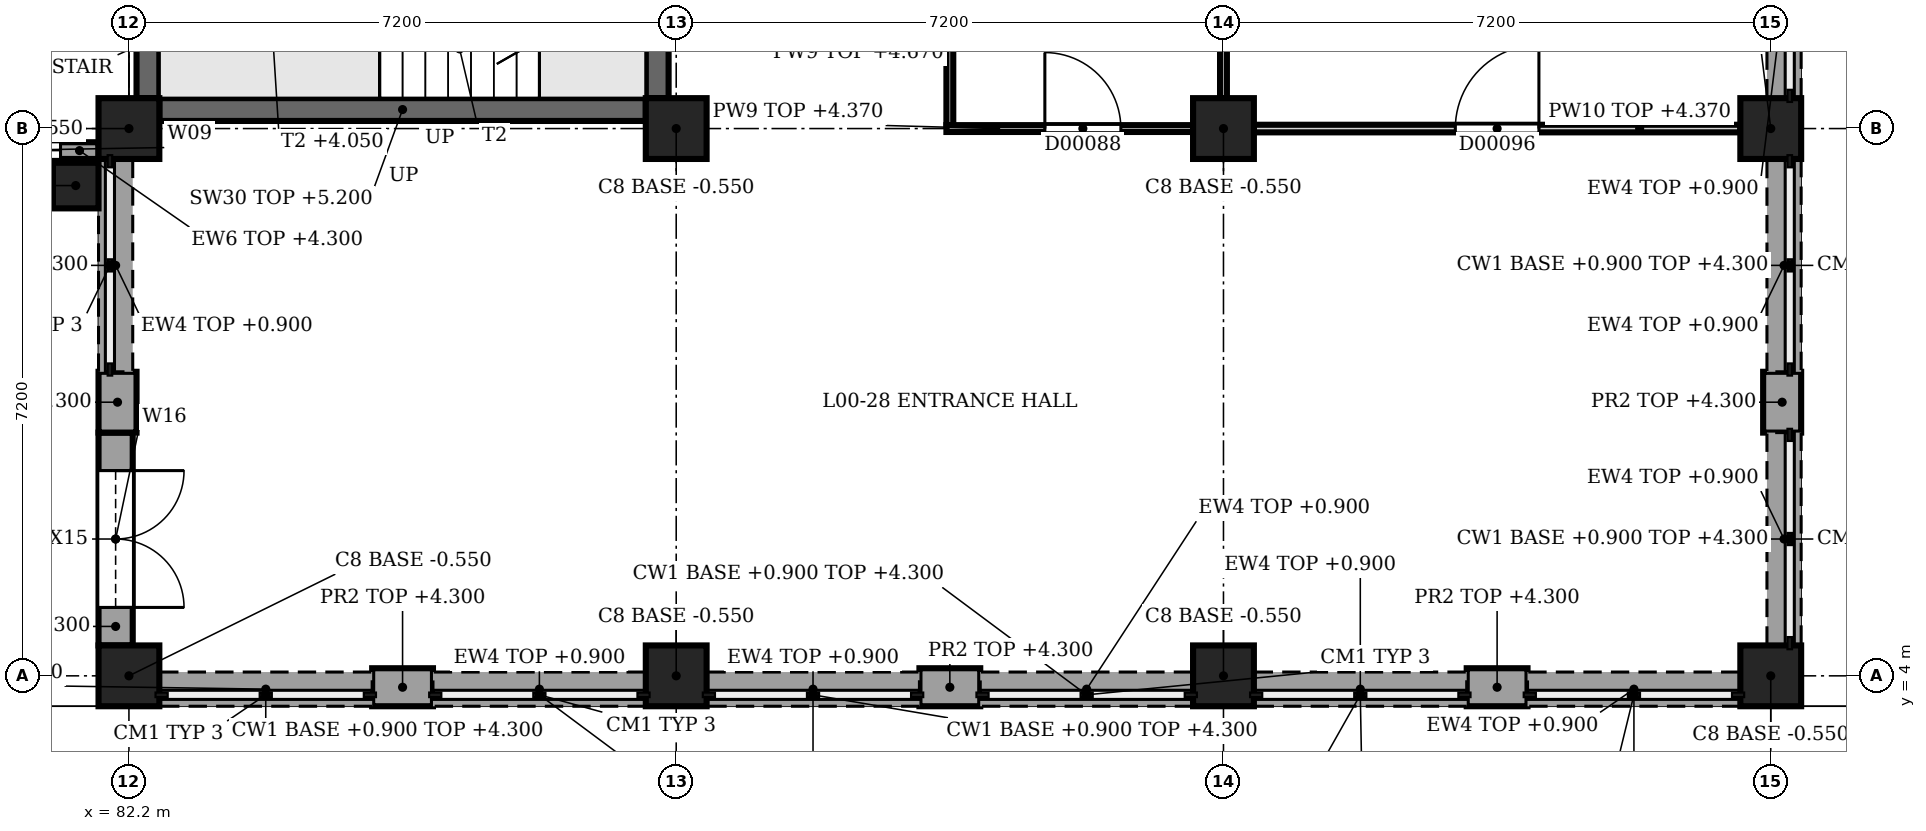
"""IFC4 building model, lengths in metres.
Left out: names, types, materials, properties, quantities, classifications, styles, units other than length and angle.
Written with IfcOpenShell. Run it as: python <this file> out.ifc"""

import sys

from ifc_helpers import new_model, si_unit, direction, frame, frame_2d, origin, origin_2d, place, context, subcontext, project, spatial, rectangle, extrude, element, fill, save


model = new_model("IFC4")
c1 = context("Model", 3, precision=1e-05, world=origin(), true_north=direction((0.0, 1.0)))
c2 = subcontext(c1, "Body", "Model", "MODEL_VIEW")
j1 = project(units=[si_unit("LENGTHUNIT", "METRE"), si_unit("PLANEANGLEUNIT", "RADIAN")], contexts=[c1])
p1 = place(None, origin())
s1 = spatial("IfcSite", under=j1, at=p1, CompositionType="ELEMENT")
p2 = place(p1, origin())
s2 = spatial("IfcBuilding", under=s1, at=p2, CompositionType="ELEMENT")
p3 = place(p2, origin())
s3 = spatial("IfcBuildingStorey", under=s2, at=p3, CompositionType="ELEMENT", Elevation=0.0)
for number, where, z_axis, x_axis in (
    (1, (82.2, 4.0, -0.55), (0.0, 0.0, 1.0), (1.0, 0.0, 0.0)),
    (2, (82.2, 11.2, -0.55), (0.0, 0.0, 1.0), (1.0, 0.0, 0.0)),
    (3, (89.4, 4.0, -0.55), (0.0, 0.0, 1.0), (1.0, 0.0, 0.0)),
    (4, (89.4, 11.2, -0.55), (0.0, 0.0, 1.0), (1.0, 0.0, 0.0)),
    (5, (96.6, 4.0, -0.55), (0.0, 0.0, 1.0), (1.0, 0.0, 0.0)),
    (6, (96.6, 11.2, -0.55), (0.0, 0.0, 1.0), (1.0, 0.0, 0.0)),
    (7, (103.8, 4.0, -0.55), (0.0, 0.0, 1.0), (1.0, 0.0, 0.0)),
    (8, (103.8, 11.2, -0.55), (0.0, 0.0, 1.0), (1.0, 0.0, 0.0)),
):
    element("IfcColumn", number, at=place(p3, frame(where, z_axis=z_axis, x_axis=x_axis)), inside=s3, PredefinedType="COLUMN", context=c2, shape_type="SweptSolid", body=[
        extrude(rectangle(XDim=0.8, YDim=0.8, at=origin_2d()), origin(), (0.0, 0.0, 1.0), 5.95),
    ])
p4 = place(p3, frame((81.5, 10.45, -0.55), z_axis=(0.0, 0.0, 1.0), x_axis=(1.0, 0.0, 0.0)))
e9 = element("IfcColumn", 9, at=p4, inside=s3, PredefinedType="COLUMN", context=c2, shape_type="SweptSolid", body=[
    extrude(rectangle(XDim=0.6, YDim=0.6, at=origin_2d()), origin(), (0.0, 0.0, 1.0), 5.95),
])
p5 = place(p3, frame((103.95, 8.0, 0.0), z_axis=(0.0, 0.0, 1.0), x_axis=(0.0, -1.0, 0.0)))
e10 = element("IfcWall", 10, at=p5, inside=s3, PredefinedType="SOLIDWALL", context=c2, shape_type="SweptSolid", body=[
    extrude(rectangle(XDim=0.8, YDim=0.5, at=frame_2d((0.4, 0.0))), origin(), (0.0, 0.0, 1.0), 4.3),
])
p6 = place(p3, frame((103.975, 14.4, 0.0), z_axis=(0.0, 0.0, 1.0), x_axis=(0.0, -1.0, 0.0)))
e11 = element("IfcWall", 11, at=p6, inside=s3, PredefinedType="SOLIDWALL", context=c2, shape_type="SweptSolid", body=[
    extrude(rectangle(XDim=2.8, YDim=0.45, at=frame_2d((1.4, 0.0))), origin(), (0.0, 0.0, 1.0), 0.9),
])
for number, where, z_axis, x_axis in (
    (12, (103.975, 10.8, 0.0), (0.0, 0.0, 1.0), (0.0, -1.0, 0.0)),
    (13, (103.975, 7.2, 0.0), (0.0, 0.0, 1.0), (0.0, -1.0, 0.0)),
):
    element("IfcWall", number, at=place(p3, frame(where, z_axis=z_axis, x_axis=x_axis)), inside=s3, PredefinedType="SOLIDWALL", context=c2, shape_type="SweptSolid", body=[
        extrude(rectangle(XDim=2.8, YDim=0.45, at=frame_2d((1.4, 0.0))), origin(), (0.0, 0.0, 1.0), 0.9),
    ])
p7 = place(p3, frame((100.6, 3.85, 0.0), z_axis=(0.0, 0.0, 1.0), x_axis=(-1.0, 0.0, 0.0)))
e14 = element("IfcWall", 14, at=p7, inside=s3, PredefinedType="SOLIDWALL", context=c2, shape_type="SweptSolid", body=[
    extrude(rectangle(XDim=0.8, YDim=0.5, at=frame_2d((0.4, 0.0))), origin(), (0.0, 0.0, 1.0), 4.3),
])
p8 = place(p3, frame((93.4, 3.85, 0.0), z_axis=(0.0, 0.0, 1.0), x_axis=(-1.0, 0.0, 0.0)))
e15 = element("IfcWall", 15, at=p8, inside=s3, PredefinedType="SOLIDWALL", context=c2, shape_type="SweptSolid", body=[
    extrude(rectangle(XDim=0.8, YDim=0.5, at=frame_2d((0.4, 0.0))), origin(), (0.0, 0.0, 1.0), 4.3),
])
p9 = place(p3, frame((86.2, 3.85, 0.0), z_axis=(0.0, 0.0, 1.0), x_axis=(-1.0, 0.0, 0.0)))
e16 = element("IfcWall", 16, at=p9, inside=s3, PredefinedType="SOLIDWALL", context=c2, shape_type="SweptSolid", body=[
    extrude(rectangle(XDim=0.8, YDim=0.5, at=frame_2d((0.4, 0.0))), origin(), (0.0, 0.0, 1.0), 4.3),
])
p10 = place(p3, frame((103.4, 3.825, 0.0), z_axis=(0.0, 0.0, 1.0), x_axis=(-1.0, 0.0, 0.0)))
e17 = element("IfcWall", 17, at=p10, inside=s3, PredefinedType="SOLIDWALL", context=c2, shape_type="SweptSolid", body=[
    extrude(rectangle(XDim=2.8, YDim=0.45, at=frame_2d((1.4, 0.0))), origin(), (0.0, 0.0, 1.0), 0.9),
])
for number, where, z_axis, x_axis in (
    (18, (99.8, 3.825, 0.0), (0.0, 0.0, 1.0), (-1.0, 0.0, 0.0)),
    (19, (96.2, 3.825, 0.0), (0.0, 0.0, 1.0), (-1.0, 0.0, 0.0)),
    (20, (92.6, 3.825, 0.0), (0.0, 0.0, 1.0), (-1.0, 0.0, 0.0)),
    (21, (89.0, 3.825, 0.0), (0.0, 0.0, 1.0), (-1.0, 0.0, 0.0)),
):
    element("IfcWall", number, at=place(p3, frame(where, z_axis=z_axis, x_axis=x_axis)), inside=s3, PredefinedType="SOLIDWALL", context=c2, shape_type="SweptSolid", body=[
        extrude(rectangle(XDim=2.8, YDim=0.45, at=frame_2d((1.4, 0.0))), origin(), (0.0, 0.0, 1.0), 0.9),
    ])
p11 = place(p3, frame((85.4, 3.825, 0.0), z_axis=(0.0, 0.0, 1.0), x_axis=(-1.0, 0.0, 0.0)))
e22 = element("IfcWall", 22, at=p11, inside=s3, PredefinedType="SOLIDWALL", context=c2, shape_type="SweptSolid", body=[
    extrude(rectangle(XDim=2.8, YDim=0.45, at=frame_2d((1.4, 0.0))), origin(), (0.0, 0.0, 1.0), 0.9),
])
p12 = place(p3, frame((82.05, 7.2, 0.0), z_axis=(0.0, 0.0, 1.0), x_axis=(0.0, 1.0, 0.0)))
e23 = element("IfcWall", 23, at=p12, inside=s3, PredefinedType="SOLIDWALL", context=c2, shape_type="SweptSolid", body=[
    extrude(rectangle(XDim=0.8, YDim=0.5, at=frame_2d((0.4, 0.0))), origin(), (0.0, 0.0, 1.0), 4.3),
])
p13 = place(p3, frame((82.025, 4.4, 0.0), z_axis=(0.0, 0.0, 1.0), x_axis=(0.0, 1.0, 0.0)))
e24 = element("IfcWall", 24, at=p13, inside=s3, PredefinedType="SOLIDWALL", context=c2, shape_type="SweptSolid", body=[
    extrude(rectangle(XDim=2.8, YDim=0.45, at=frame_2d((1.4, 0.0))), origin(), (0.0, 0.0, 1.0), 4.3),
])
p14 = place(p13, frame((0.5, 0.0, 0.0)))
e25 = element("IfcOpeningElement", 25, at=p14, cuts=e24, PredefinedType="OPENING", context=c2, shape_type="SweptSolid", body=[
    extrude(rectangle(XDim=1.8, YDim=2.4, at=frame_2d((0.9, 1.2))), frame((0.0, 0.235, 0.0), z_axis=(0.0, -1.0, 0.0), x_axis=(1.0, 0.0, 0.0)), (0.0, 0.0, 1.0), 0.47),
])
p15 = place(p13, frame((0.5, 0.0, 2.5)))
e26 = element("IfcOpeningElement", 26, at=p15, cuts=e24, PredefinedType="OPENING", context=c2, shape_type="SweptSolid", body=[
    extrude(rectangle(XDim=1.8, YDim=0.45, at=frame_2d((0.9, 0.225))), frame((0.0, 0.235, 0.0), z_axis=(0.0, -1.0, 0.0), x_axis=(1.0, 0.0, 0.0)), (0.0, 0.0, 1.0), 0.47),
])
p16 = place(p3, frame((82.025, 8.0, 0.0), z_axis=(0.0, 0.0, 1.0), x_axis=(0.0, 1.0, 0.0)))
e27 = element("IfcWall", 27, at=p16, inside=s3, PredefinedType="SOLIDWALL", context=c2, shape_type="SweptSolid", body=[
    extrude(rectangle(XDim=2.8, YDim=0.45, at=frame_2d((1.4, 0.0))), origin(), (0.0, 0.0, 1.0), 0.9),
])
p17 = place(p3, frame((81.8, 10.91, 0.0), z_axis=(0.0, 0.0, 1.0), x_axis=(-1.0, 0.0, 0.0)))
e28 = element("IfcWall", 28, at=p17, inside=s3, PredefinedType="SOLIDWALL", context=c2, shape_type="SweptSolid", body=[
    extrude(rectangle(XDim=2.8, YDim=0.22, at=frame_2d((1.4, 0.0))), origin(), (0.0, 0.0, 1.0), 4.3),
])
p18 = place(p17, frame((0.5, 0.0, 0.9)))
e29 = element("IfcOpeningElement", 29, at=p18, cuts=e28, PredefinedType="OPENING", context=c2, shape_type="SweptSolid", body=[
    extrude(rectangle(XDim=1.8, YDim=2.1, at=frame_2d((0.9, 1.05))), frame((0.0, 0.12, 0.0), z_axis=(0.0, -1.0, 0.0), x_axis=(1.0, 0.0, 0.0)), (0.0, 0.0, 1.0), 0.24),
])
p19 = place(p3, frame((89.15, 11.6, 0.0), z_axis=(0.0, 0.0, 1.0), x_axis=(0.0, 1.0, 0.0)))
e30 = element("IfcWall", 30, at=p19, inside=s3, PredefinedType="SHEAR", context=c2, shape_type="SweptSolid", body=[
    extrude(rectangle(XDim=6.4, YDim=0.3, at=frame_2d((3.2, 0.0))), origin(), (0.0, 0.0, 1.0), 5.2),
])
p20 = place(p19, frame((4.2, 0.0, 0.0)))
e31 = element("IfcOpeningElement", 31, at=p20, cuts=e30, PredefinedType="OPENING", context=c2, shape_type="SweptSolid", body=[
    extrude(rectangle(XDim=1.2, YDim=2.1, at=frame_2d((0.6, 1.05))), frame((0.0, 0.16, 0.0), z_axis=(0.0, -1.0, 0.0), x_axis=(1.0, 0.0, 0.0)), (0.0, 0.0, 1.0), 0.32),
])
for number, where, z_axis, x_axis in (
    (32, (82.45, 11.6, 0.0), (0.0, 0.0, 1.0), (0.0, 1.0, 0.0)),
    (33, (82.6, 11.45, 0.0), (0.0, 0.0, 1.0), (1.0, 0.0, 0.0)),
):
    element("IfcWall", number, at=place(p3, frame(where, z_axis=z_axis, x_axis=x_axis)), inside=s3, PredefinedType="SHEAR", context=c2, shape_type="SweptSolid", body=[
        extrude(rectangle(XDim=6.4, YDim=0.3, at=frame_2d((3.2, 0.0))), origin(), (0.0, 0.0, 1.0), 5.2),
    ])
p21 = place(p3, frame((92.955, 11.2, 0.0), z_axis=(0.0, 0.0, 1.0), x_axis=(1.0, 0.0, 0.0)))
e34 = element("IfcWall", 34, at=p21, inside=s3, PredefinedType="PARTITIONING", context=c2, shape_type="SweptSolid", body=[
    extrude(rectangle(XDim=3.245, YDim=0.09, at=frame_2d((1.623, 0.0))), origin(), (0.0, 0.0, 1.0), 4.37),
])
p22 = place(p21, frame((1.295, 0.0, 0.0)))
e35 = element("IfcOpeningElement", 35, at=p22, cuts=e34, PredefinedType="OPENING", context=c2, shape_type="SweptSolid", body=[
    extrude(rectangle(XDim=1.0, YDim=2.2, at=frame_2d((0.5, 1.1))), frame((0.0, 0.055, 0.0), z_axis=(0.0, -1.0, 0.0), x_axis=(1.0, 0.0, 0.0)), (0.0, 0.0, 1.0), 0.11),
])
p23 = place(p3, frame((97.0, 11.2, 0.0), z_axis=(0.0, 0.0, 1.0), x_axis=(1.0, 0.0, 0.0)))
e36 = element("IfcWall", 36, at=p23, inside=s3, PredefinedType="PARTITIONING", context=c2, shape_type="SweptSolid", body=[
    extrude(rectangle(XDim=6.4, YDim=0.1, at=frame_2d((3.2, 0.0))), origin(), (0.0, 0.0, 1.0), 4.37),
])
p24 = place(p23, frame((2.65, 0.0, 0.0)))
e37 = element("IfcOpeningElement", 37, at=p24, cuts=e36, PredefinedType="OPENING", context=c2, shape_type="SweptSolid", body=[
    extrude(rectangle(XDim=1.1, YDim=2.2, at=frame_2d((0.55, 1.1))), frame((0.0, 0.06, 0.0), z_axis=(0.0, -1.0, 0.0), x_axis=(1.0, 0.0, 0.0)), (0.0, 0.0, 1.0), 0.12),
])
p25 = place(p3, frame((93.0, 11.245, 0.0), z_axis=(0.0, 0.0, 1.0), x_axis=(0.0, 1.0, 0.0)))
e38 = element("IfcWall", 38, at=p25, inside=s3, PredefinedType="PARTITIONING", context=c2, shape_type="SweptSolid", body=[
    extrude(rectangle(XDim=3.51, YDim=0.09, at=frame_2d((1.755, 0.0))), origin(), (0.0, 0.0, 1.0), 4.67),
])
p26 = place(p3, frame((96.6, 11.6, 0.0), z_axis=(0.0, 0.0, 1.0), x_axis=(0.0, 1.0, 0.0)))
e39 = element("IfcWall", 39, at=p26, inside=s3, PredefinedType="PARTITIONING", context=c2, shape_type="SweptSolid", body=[
    extrude(rectangle(XDim=3.155, YDim=0.09, at=frame_2d((1.577, 0.0))), origin(), (0.0, 0.0, 1.0), 4.37),
])
p27 = place(p14, origin())
e40 = element("IfcDoor", 40, at=p27, inside=s3, OperationType="SINGLE_SWING_LEFT", PredefinedType="DOOR", context=c2, shape_type="SweptSolid", body=[
    extrude(rectangle(XDim=1.8, YDim=2.4, at=frame_2d((0.9, 1.2))), frame((0.0, 0.025, 0.0), z_axis=(0.0, -1.0, 0.0), x_axis=(1.0, 0.0, 0.0)), (0.0, 0.0, 1.0), 0.05),
])
fill(e25, e40)
p28 = place(p15, origin())
e41 = element("IfcWindow", 41, at=p28, inside=s3, PartitioningType="SINGLE_PANEL", PredefinedType="WINDOW", context=c2, shape_type="SweptSolid", body=[
    extrude(rectangle(XDim=1.8, YDim=0.45, at=frame_2d((0.9, 0.225))), frame((0.0, 0.03, 0.0), z_axis=(0.0, -1.0, 0.0), x_axis=(1.0, 0.0, 0.0)), (0.0, 0.0, 1.0), 0.06),
])
fill(e26, e41)
p29 = place(p18, origin())
e42 = element("IfcWindow", 42, at=p29, inside=s3, PartitioningType="SINGLE_PANEL", PredefinedType="WINDOW", context=c2, shape_type="SweptSolid", body=[
    extrude(rectangle(XDim=1.8, YDim=2.1, at=frame_2d((0.9, 1.05))), frame((0.0, 0.03, 0.0), z_axis=(0.0, -1.0, 0.0), x_axis=(1.0, 0.0, 0.0)), (0.0, 0.0, 1.0), 0.06),
])
fill(e29, e42)
p30 = place(p22, origin())
e43 = element("IfcDoor", 43, at=p30, inside=s3, OperationType="SINGLE_SWING_RIGHT", PredefinedType="DOOR", context=c2, shape_type="SweptSolid", body=[
    extrude(rectangle(XDim=1.0, YDim=2.2, at=frame_2d((0.5, 1.1))), frame((0.0, 0.025, 0.0), z_axis=(0.0, -1.0, 0.0), x_axis=(1.0, 0.0, 0.0)), (0.0, 0.0, 1.0), 0.05),
])
fill(e35, e43)
p31 = place(p24, origin())
e44 = element("IfcDoor", 44, at=p31, inside=s3, OperationType="SINGLE_SWING_RIGHT", PredefinedType="DOOR", context=c2, shape_type="SweptSolid", body=[
    extrude(rectangle(XDim=1.1, YDim=2.2, at=frame_2d((0.55, 1.1))), frame((0.0, 0.025, 0.0), z_axis=(0.0, -1.0, 0.0), x_axis=(1.0, 0.0, 0.0)), (0.0, 0.0, 1.0), 0.05),
])
fill(e37, e44)
save(model, sys.argv[1])
